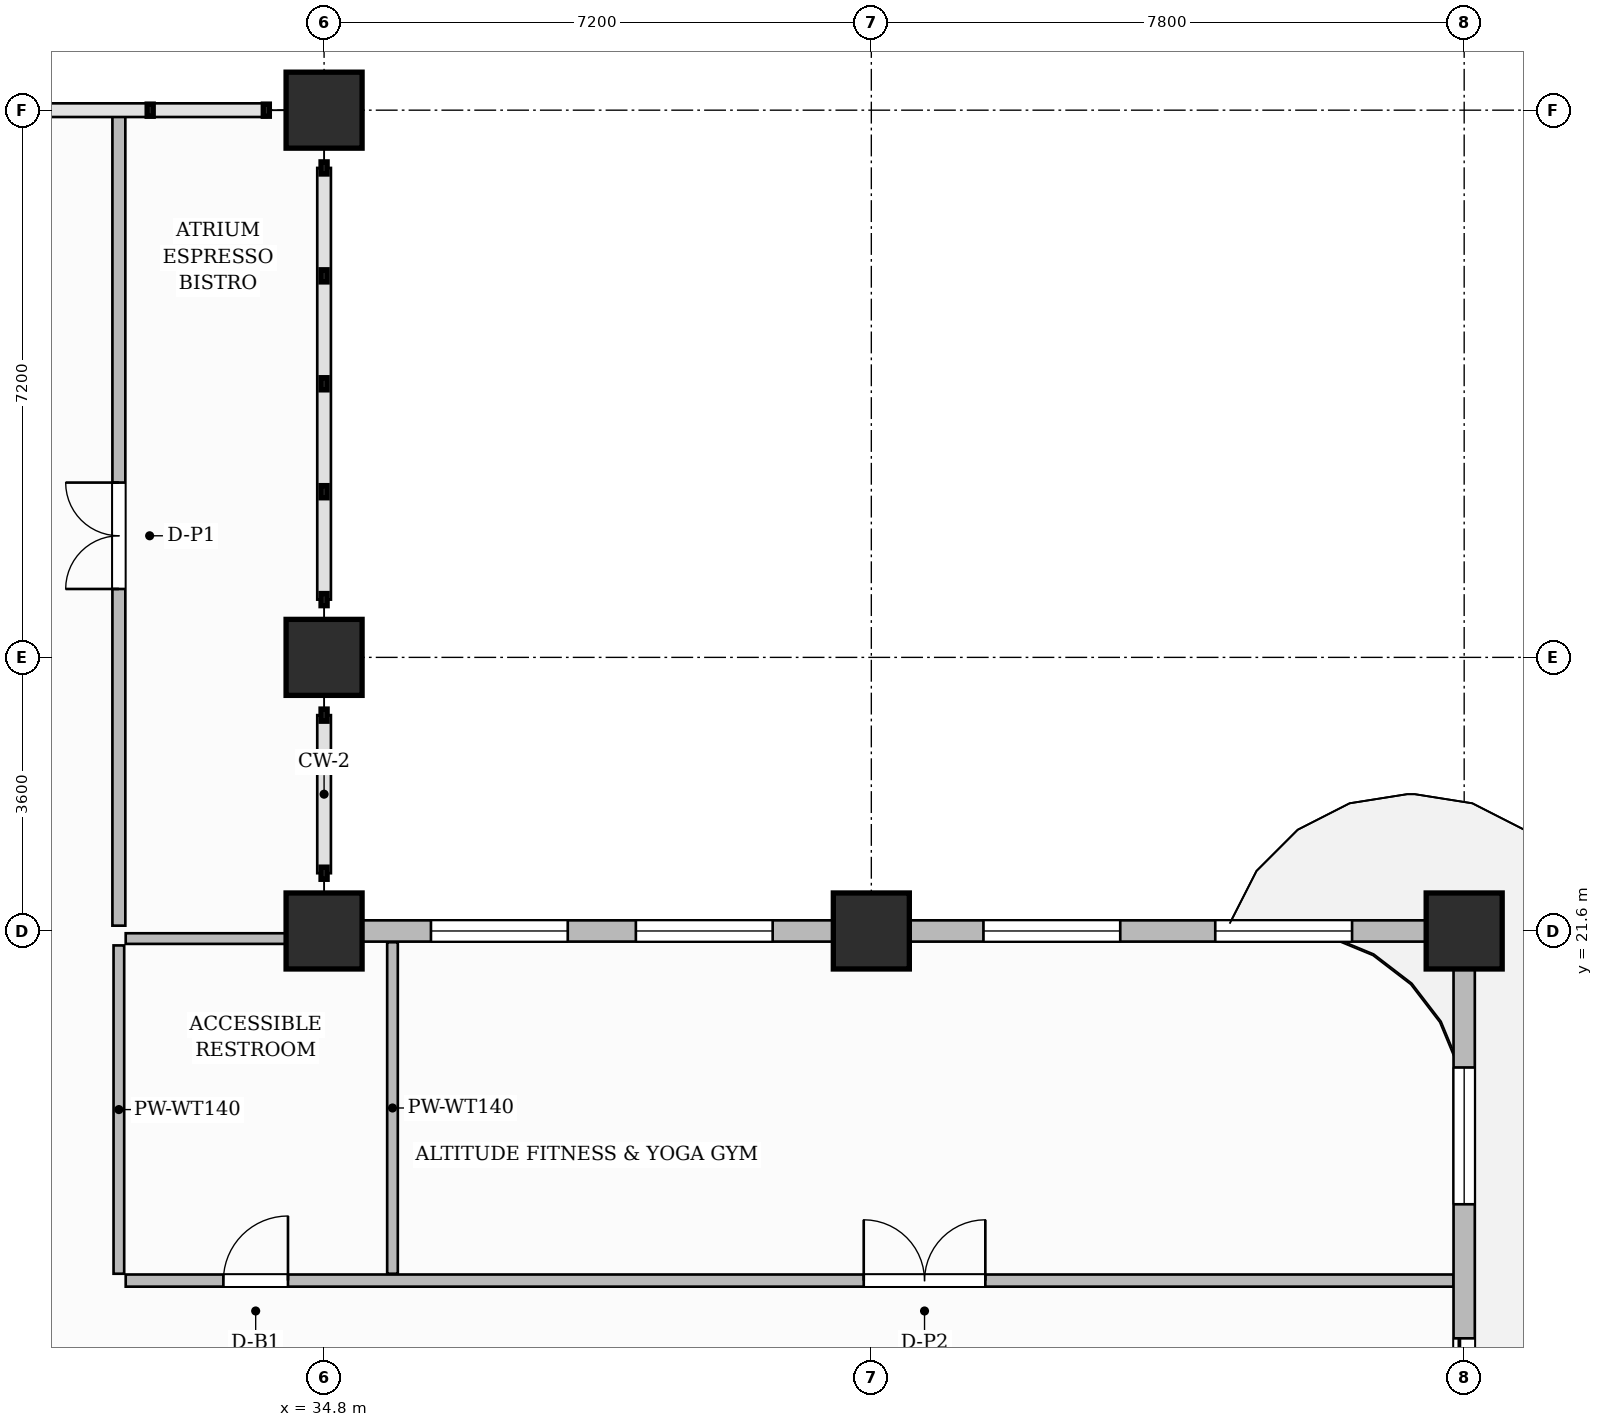
"""IFC4 building model, lengths in metres.
Left out: names, types, materials, properties, quantities, classifications, styles, units other than length and angle.
Written with IfcOpenShell. Run it as: python <this file> out.ifc"""

import sys

from ifc_helpers import new_model, si_unit, direction, frame, frame_2d, origin, origin_2d, place, context, subcontext, project, spatial, rectangle, extrude, source, transform, mapped, element, fill, save


model = new_model("IFC4")
c1 = context("Model", 3, precision=1e-05, world=origin(), true_north=direction((0.0, 1.0)))
c2 = subcontext(c1, "Body", "Model", "MODEL_VIEW")
j1 = project(units=[si_unit("LENGTHUNIT", "METRE"), si_unit("PLANEANGLEUNIT", "RADIAN")], contexts=[c1])
p1 = place(None, origin())
s1 = spatial("IfcSite", under=j1, at=p1, CompositionType="ELEMENT")
p2 = place(p1, origin())
s2 = spatial("IfcBuilding", under=s1, at=p2, CompositionType="ELEMENT")
p3 = place(p2, frame((0.0, 0.0, 134.0)))
s3 = spatial("IfcBuildingStorey", under=s2, at=p3, CompositionType="ELEMENT", Elevation=134.0)
m1 = source(origin(), c2, "Body", "SweptSolid", [
    extrude(rectangle(XDim=1.0, YDim=1.0, at=origin_2d()), origin(), (0.0, 0.0, 1.0), 3.7),
])
for number, where, z_axis, x_axis in (
    (1, (34.8, 21.6, 0.0), (0.0, 0.0, 1.0), (1.0, 0.0, 0.0)),
    (2, (34.8, 25.2, 0.0), (0.0, 0.0, 1.0), (1.0, 0.0, 0.0)),
    (3, (34.8, 32.4, 0.0), (0.0, 0.0, 1.0), (1.0, 0.0, 0.0)),
    (4, (42.0, 21.6, 0.0), (0.0, 0.0, 1.0), (1.0, 0.0, 0.0)),
    (5, (49.8, 21.6, 0.0), (0.0, 0.0, 1.0), (1.0, 0.0, 0.0)),
):
    element("IfcColumn", number, at=place(p3, frame(where, z_axis=z_axis, x_axis=x_axis)), inside=s3, PredefinedType="COLUMN", context=c2, shape_type="MappedRepresentation", body=[
        mapped(m1, transform((0.0, 0.0, 0.0), scale=1.0)),
    ])
p4 = place(p3, frame((32.19, 17.0, 0.0), z_axis=(0.0, 0.0, 1.0), x_axis=(1.0, 0.0, 0.0)))
e6 = element("IfcWall", 6, at=p4, inside=s3, PredefinedType="PARTITIONING", context=c2, shape_type="SweptSolid", body=[
    extrude(rectangle(XDim=17.47, YDim=0.16, at=frame_2d((8.735, 0.0))), origin(), (0.0, 0.0, 1.0), 3.45),
])
p5 = place(p4, frame((1.285, 0.0, 0.0)))
e7 = element("IfcOpeningElement", 7, at=p5, cuts=e6, PredefinedType="OPENING", context=c2, shape_type="SweptSolid", body=[
    extrude(rectangle(XDim=0.85, YDim=2.1, at=frame_2d((0.425, 1.05))), frame((0.0, 0.09, 0.0), z_axis=(0.0, -1.0, 0.0), x_axis=(1.0, 0.0, 0.0)), (0.0, 0.0, 1.0), 0.18),
])
p6 = place(p4, frame((9.71, 0.0, 0.0)))
e8 = element("IfcOpeningElement", 8, at=p6, cuts=e6, PredefinedType="OPENING", context=c2, shape_type="SweptSolid", body=[
    extrude(rectangle(XDim=1.6, YDim=2.4, at=frame_2d((0.8, 1.2))), frame((0.0, 0.09, 0.0), z_axis=(0.0, -1.0, 0.0), x_axis=(1.0, 0.0, 0.0)), (0.0, 0.0, 1.0), 0.18),
])
p7 = place(p3, frame((32.1, 17.09, 0.0), z_axis=(0.0, 0.0, 1.0), x_axis=(0.0, 1.0, 0.0)))
e9 = element("IfcWall", 9, at=p7, inside=s3, PredefinedType="PARTITIONING", context=c2, shape_type="SweptSolid", body=[
    extrude(rectangle(XDim=4.32, YDim=0.14, at=frame_2d((2.16, 0.0))), origin(), (0.0, 0.0, 1.0), 3.45),
])
p8 = place(p3, frame((35.7, 17.09, 0.0), z_axis=(0.0, 0.0, 1.0), x_axis=(0.0, 1.0, 0.0)))
e10 = element("IfcWall", 10, at=p8, inside=s3, PredefinedType="PARTITIONING", context=c2, shape_type="SweptSolid", body=[
    extrude(rectangle(XDim=4.362, YDim=0.14, at=frame_2d((2.181, 0.0))), origin(), (0.0, 0.0, 1.0), 3.45),
])
p9 = place(p3, frame((32.19, 21.5, 0.0), z_axis=(0.0, 0.0, 1.0), x_axis=(1.0, 0.0, 0.0)))
e11 = element("IfcWall", 11, at=p9, inside=s3, PredefinedType="PARTITIONING", context=c2, shape_type="SweptSolid", body=[
    extrude(rectangle(XDim=2.42, YDim=0.14, at=frame_2d((1.21, 0.0))), origin(), (0.0, 0.0, 1.0), 2.935),
])
p10 = place(p3, frame((32.1, 21.67, 0.0), z_axis=(0.0, 0.0, 1.0), x_axis=(0.0, 1.0, 0.0)))
e12 = element("IfcWall", 12, at=p10, inside=s3, PredefinedType="PARTITIONING", context=c2, shape_type="SweptSolid", body=[
    extrude(rectangle(XDim=10.702, YDim=0.17, at=frame_2d((5.351, 0.0))), origin(), (0.0, 0.0, 1.0), 3.45),
])
p11 = place(p10, frame((4.43, 0.0, 0.0)))
e13 = element("IfcOpeningElement", 13, at=p11, cuts=e12, PredefinedType="OPENING", context=c2, shape_type="SweptSolid", body=[
    extrude(rectangle(XDim=1.4, YDim=2.35, at=frame_2d((0.7, 1.175))), frame((0.0, 0.095, 0.0), z_axis=(0.0, -1.0, 0.0), x_axis=(1.0, 0.0, 0.0)), (0.0, 0.0, 1.0), 0.19),
])
p12 = place(p3, frame((49.8, 14.62, 0.0), z_axis=(0.0, 0.0, 1.0), x_axis=(0.0, 1.0, 0.0)))
e14 = element("IfcWall", 14, at=p12, inside=s3, PredefinedType="SOLIDWALL", context=c2, shape_type="SweptSolid", body=[
    extrude(rectangle(XDim=6.93, YDim=0.28, at=frame_2d((3.465, 0.0))), origin(), (0.0, 0.0, 1.0), 2.935),
])
p13 = place(p12, frame((0.42, 0.0, 0.0)))
e15 = element("IfcOpeningElement", 15, at=p13, cuts=e14, PredefinedType="OPENING", context=c2, shape_type="SweptSolid", body=[
    extrude(rectangle(XDim=1.2, YDim=2.2, at=frame_2d((0.6, 1.1))), frame((0.0, 0.15, 0.0), z_axis=(0.0, -1.0, 0.0), x_axis=(1.0, 0.0, 0.0)), (0.0, 0.0, 1.0), 0.3),
])
p14 = place(p12, frame((3.384, 0.0, 0.8)))
e16 = element("IfcOpeningElement", 16, at=p14, cuts=e14, PredefinedType="OPENING", context=c2, shape_type="SweptSolid", body=[
    extrude(rectangle(XDim=1.8, YDim=1.85, at=frame_2d((0.9, 0.925))), frame((0.0, 0.15, 0.0), z_axis=(0.0, -1.0, 0.0), x_axis=(1.0, 0.0, 0.0)), (0.0, 0.0, 1.0), 0.3),
])
p15 = place(p3, frame((34.8, 21.6, 0.0), z_axis=(0.0, 0.0, 1.0), x_axis=(1.0, 0.0, 0.0)))
e17 = element("IfcWall", 17, at=p15, inside=s3, PredefinedType="SOLIDWALL", context=c2, shape_type="SweptSolid", body=[
    extrude(rectangle(XDim=15.0, YDim=0.28, at=frame_2d((7.5, 0.0))), origin(), (0.0, 0.0, 1.0), 2.935),
])
p16 = place(p15, frame((1.406, 0.0, 0.8)))
e18 = element("IfcOpeningElement", 18, at=p16, cuts=e17, PredefinedType="OPENING", context=c2, shape_type="SweptSolid", body=[
    extrude(rectangle(XDim=1.8, YDim=1.85, at=frame_2d((0.9, 0.925))), frame((0.0, 0.15, 0.0), z_axis=(0.0, -1.0, 0.0), x_axis=(1.0, 0.0, 0.0)), (0.0, 0.0, 1.0), 0.3),
])
p17 = place(p15, frame((4.102, 0.0, 0.8)))
e19 = element("IfcOpeningElement", 19, at=p17, cuts=e17, PredefinedType="OPENING", context=c2, shape_type="SweptSolid", body=[
    extrude(rectangle(XDim=1.8, YDim=1.85, at=frame_2d((0.9, 0.925))), frame((0.0, 0.15, 0.0), z_axis=(0.0, -1.0, 0.0), x_axis=(1.0, 0.0, 0.0)), (0.0, 0.0, 1.0), 0.3),
])
p18 = place(p15, frame((8.675, 0.0, 0.8)))
e20 = element("IfcOpeningElement", 20, at=p18, cuts=e17, PredefinedType="OPENING", context=c2, shape_type="SweptSolid", body=[
    extrude(rectangle(XDim=1.8, YDim=1.85, at=frame_2d((0.9, 0.925))), frame((0.0, 0.15, 0.0), z_axis=(0.0, -1.0, 0.0), x_axis=(1.0, 0.0, 0.0)), (0.0, 0.0, 1.0), 0.3),
])
p19 = place(p15, frame((11.725, 0.0, 0.8)))
e21 = element("IfcOpeningElement", 21, at=p19, cuts=e17, PredefinedType="OPENING", context=c2, shape_type="SweptSolid", body=[
    extrude(rectangle(XDim=1.8, YDim=1.85, at=frame_2d((0.9, 0.925))), frame((0.0, 0.15, 0.0), z_axis=(0.0, -1.0, 0.0), x_axis=(1.0, 0.0, 0.0)), (0.0, 0.0, 1.0), 0.3),
])
m2 = source(origin(), c2, "Body", "SweptSolid", [
    extrude(rectangle(XDim=0.85, YDim=2.1, at=frame_2d((0.425, 1.05))), frame((0.0, 0.025, 0.0), z_axis=(0.0, -1.0, 0.0), x_axis=(1.0, 0.0, 0.0)), (0.0, 0.0, 1.0), 0.05),
])
p20 = place(p5, origin())
e22 = element("IfcDoor", 22, at=p20, inside=s3, OperationType="SINGLE_SWING_RIGHT", PredefinedType="DOOR", context=c2, shape_type="MappedRepresentation", body=[
    mapped(m2, transform((0.0, 0.0, 0.0), scale=1.0)),
])
fill(e7, e22)
m3 = source(origin(), c2, "Body", "SweptSolid", [
    extrude(rectangle(XDim=1.6, YDim=2.4, at=frame_2d((0.8, 1.2))), frame((0.0, 0.025, 0.0), z_axis=(0.0, -1.0, 0.0), x_axis=(1.0, 0.0, 0.0)), (0.0, 0.0, 1.0), 0.05),
])
p21 = place(p6, origin())
e23 = element("IfcDoor", 23, at=p21, inside=s3, OperationType="DOUBLE_DOOR_SINGLE_SWING", PredefinedType="DOOR", context=c2, shape_type="MappedRepresentation", body=[
    mapped(m3, transform((0.0, 0.0, 0.0), scale=1.0)),
])
fill(e8, e23)
m4 = source(origin(), c2, "Body", "SweptSolid", [
    extrude(rectangle(XDim=1.4, YDim=2.35, at=frame_2d((0.7, 1.175))), frame((0.0, 0.025, 0.0), z_axis=(0.0, -1.0, 0.0), x_axis=(1.0, 0.0, 0.0)), (0.0, 0.0, 1.0), 0.05),
])
p22 = place(p11, origin())
e24 = element("IfcDoor", 24, at=p22, inside=s3, OperationType="DOUBLE_DOOR_SINGLE_SWING", PredefinedType="DOOR", context=c2, shape_type="MappedRepresentation", body=[
    mapped(m4, transform((0.0, 0.0, 0.0), scale=1.0)),
])
fill(e13, e24)
m5 = source(origin(), c2, "Body", "SweptSolid", [
    extrude(rectangle(XDim=1.2, YDim=2.2, at=frame_2d((0.6, 1.1))), frame((0.0, 0.025, 0.0), z_axis=(0.0, -1.0, 0.0), x_axis=(1.0, 0.0, 0.0)), (0.0, 0.0, 1.0), 0.05),
])
p23 = place(p13, origin())
e25 = element("IfcDoor", 25, at=p23, inside=s3, OperationType="SLIDING_TO_LEFT", PredefinedType="DOOR", context=c2, shape_type="MappedRepresentation", body=[
    mapped(m5, transform((0.0, 0.0, 0.0), scale=1.0)),
])
fill(e15, e25)
m6 = source(origin(), c2, "Body", "SweptSolid", [
    extrude(rectangle(XDim=1.8, YDim=1.85, at=frame_2d((0.9, 0.925))), frame((0.0, 0.03, 0.0), z_axis=(0.0, -1.0, 0.0), x_axis=(1.0, 0.0, 0.0)), (0.0, 0.0, 1.0), 0.06),
])
p24 = place(p14, origin())
e26 = element("IfcWindow", 26, at=p24, inside=s3, PartitioningType="DOUBLE_PANEL_VERTICAL", PredefinedType="WINDOW", context=c2, shape_type="MappedRepresentation", body=[
    mapped(m6, transform((0.0, 0.0, 0.0), scale=1.0)),
])
fill(e16, e26)
p25 = place(p16, origin())
e27 = element("IfcWindow", 27, at=p25, inside=s3, PartitioningType="DOUBLE_PANEL_VERTICAL", PredefinedType="WINDOW", context=c2, shape_type="MappedRepresentation", body=[
    mapped(m6, transform((0.0, 0.0, 0.0), scale=1.0)),
])
fill(e18, e27)
p26 = place(p17, origin())
e28 = element("IfcWindow", 28, at=p26, inside=s3, PartitioningType="DOUBLE_PANEL_VERTICAL", PredefinedType="WINDOW", context=c2, shape_type="MappedRepresentation", body=[
    mapped(m6, transform((0.0, 0.0, 0.0), scale=1.0)),
])
fill(e19, e28)
p27 = place(p18, origin())
e29 = element("IfcWindow", 29, at=p27, inside=s3, PartitioningType="DOUBLE_PANEL_VERTICAL", PredefinedType="WINDOW", context=c2, shape_type="MappedRepresentation", body=[
    mapped(m6, transform((0.0, 0.0, 0.0), scale=1.0)),
])
fill(e20, e29)
p28 = place(p19, origin())
e30 = element("IfcWindow", 30, at=p28, inside=s3, PartitioningType="DOUBLE_PANEL_VERTICAL", PredefinedType="WINDOW", context=c2, shape_type="MappedRepresentation", body=[
    mapped(m6, transform((0.0, 0.0, 0.0), scale=1.0)),
])
fill(e21, e30)
save(model, sys.argv[1])
